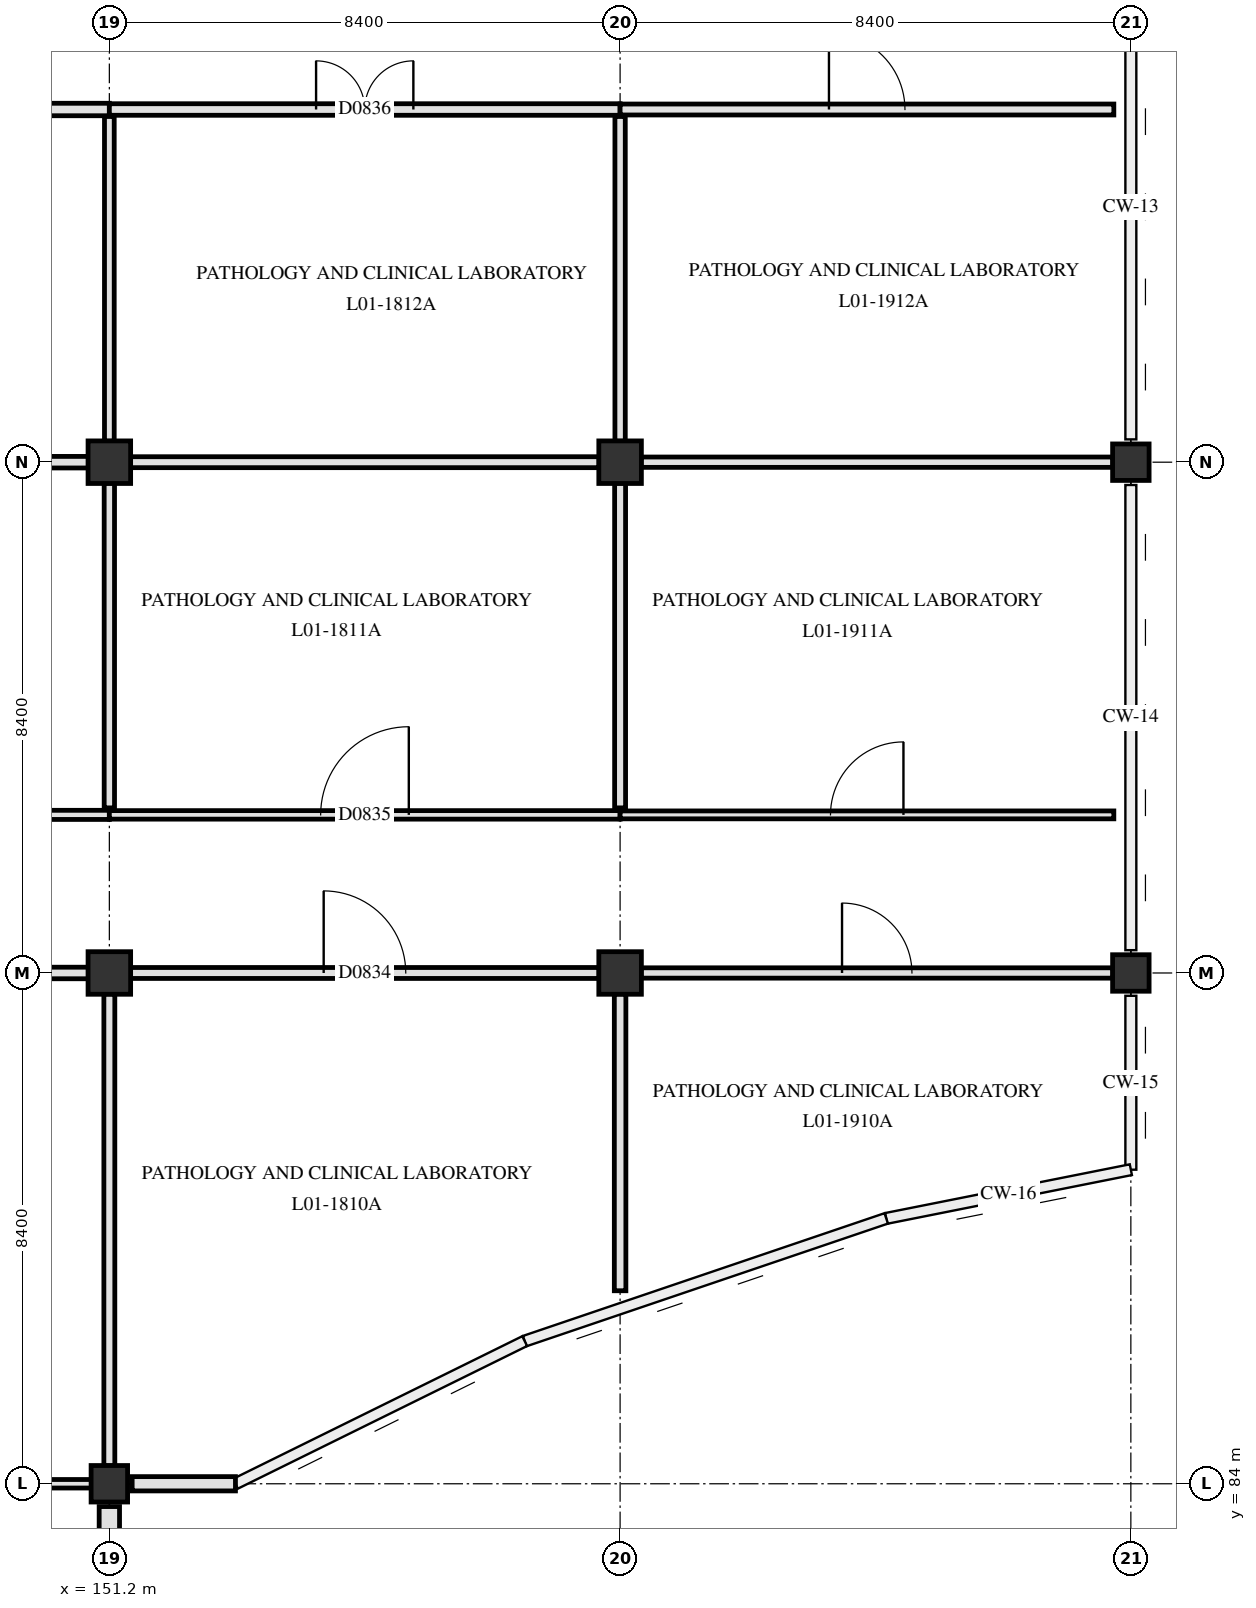
"""IFC4 building model, lengths in metres.
Left out: names, types, materials, properties, quantities, classifications, styles, units other than length and angle.
Written with IfcOpenShell. Run it as: python <this file> out.ifc"""

import sys

from ifc_helpers import new_model, si_unit, direction, frame, frame_2d, origin, origin_2d, place, context, subcontext, project, spatial, rectangle, extrude, element, fill, save


model = new_model("IFC4")
c1 = context("Model", 3, precision=1e-05, world=origin(), true_north=direction((0.0, 1.0)))
c2 = subcontext(c1, "Body", "Model", "MODEL_VIEW")
j1 = project(units=[si_unit("LENGTHUNIT", "METRE"), si_unit("PLANEANGLEUNIT", "RADIAN")], contexts=[c1])
p1 = place(None, origin())
s1 = spatial("IfcSite", under=j1, at=p1, CompositionType="ELEMENT")
p2 = place(p1, origin())
s2 = spatial("IfcBuilding", under=s1, at=p2, CompositionType="ELEMENT")
p3 = place(p2, frame((0.0, 0.0, 4.8)))
s3 = spatial("IfcBuildingStorey", under=s2, at=p3, CompositionType="ELEMENT", Elevation=4.8)
p4 = place(p3, frame((151.2, 84.0, 0.0), z_axis=(0.0, 0.0, 1.0), x_axis=(1.0, 0.0, 0.0)))
e1 = element("IfcColumn", 1, at=p4, inside=s3, PredefinedType="COLUMN", context=c2, shape_type="SweptSolid", body=[
    extrude(rectangle(XDim=0.6, YDim=0.6, at=origin_2d()), origin(), (0.0, 0.0, 1.0), 4.5),
])
for number, where, z_axis, x_axis in (
    (2, (151.2, 92.4, 0.0), (0.0, 0.0, 1.0), (1.0, 0.0, 0.0)),
    (3, (151.2, 100.8, 0.0), (0.0, 0.0, 1.0), (1.0, 0.0, 0.0)),
    (4, (159.6, 92.4, 0.0), (0.0, 0.0, 1.0), (1.0, 0.0, 0.0)),
    (5, (159.6, 100.8, 0.0), (0.0, 0.0, 1.0), (1.0, 0.0, 0.0)),
):
    element("IfcColumn", number, at=place(p3, frame(where, z_axis=z_axis, x_axis=x_axis)), inside=s3, PredefinedType="COLUMN", context=c2, shape_type="SweptSolid", body=[
        extrude(rectangle(XDim=0.7, YDim=0.7, at=origin_2d()), origin(), (0.0, 0.0, 1.0), 4.5),
    ])
for number, where, z_axis, x_axis in (
    (6, (168.0, 92.4, 0.0), (0.0, 0.0, 1.0), (1.0, 0.0, 0.0)),
    (7, (168.0, 100.8, 0.0), (0.0, 0.0, 1.0), (1.0, 0.0, 0.0)),
):
    element("IfcColumn", number, at=place(p3, frame(where, z_axis=z_axis, x_axis=x_axis)), inside=s3, PredefinedType="COLUMN", context=c2, shape_type="SweptSolid", body=[
        extrude(rectangle(XDim=0.6, YDim=0.6, at=origin_2d()), origin(), (0.0, 0.0, 1.0), 4.5),
    ])
p5 = place(p3, frame((153.274, 84.0, 0.0), z_axis=(0.0, 0.0, 1.0), x_axis=(-1.0, 0.0, 0.0)))
e8 = element("IfcWall", 8, at=p5, inside=s3, PredefinedType="SOLIDWALL", context=c2, shape_type="SweptSolid", body=[
    extrude(rectangle(XDim=1.699, YDim=0.235, at=frame_2d((0.85, 0.0))), origin(), (0.0, 0.0, 1.0), 4.14),
])
p6 = place(p3, frame((151.2, 83.625, 0.0), z_axis=(0.0, 0.0, 1.0), x_axis=(0.0, -1.0, 0.0)))
e9 = element("IfcWall", 9, at=p6, inside=s3, PredefinedType="SOLIDWALL", context=c2, shape_type="SweptSolid", body=[
    extrude(rectangle(XDim=0.858, YDim=0.335, at=frame_2d((0.429, 0.0))), origin(), (0.0, 0.0, 1.0), 4.14),
])
p7 = place(p3, frame((143.095, 84.0, 0.0), z_axis=(0.0, 0.0, 1.0), x_axis=(1.0, 0.0, 0.0)))
e10 = element("IfcWall", 10, at=p7, inside=s3, PredefinedType="PARTITIONING", context=c2, shape_type="SweptSolid", body=[
    extrude(rectangle(XDim=7.81, YDim=0.14, at=frame_2d((3.905, 0.0))), origin(), (0.0, 0.0, 1.0), 3.54),
])
p8 = place(p7, frame((3.295, 0.0, 0.0)))
e11 = element("IfcOpeningElement", 11, at=p8, cuts=e10, PredefinedType="OPENING", context=c2, shape_type="SweptSolid", body=[
    extrude(rectangle(XDim=1.22, YDim=2.18, at=frame_2d((0.61, 1.09))), frame((0.0, 0.08, 0.0), z_axis=(0.0, -1.0, 0.0), x_axis=(1.0, 0.0, 0.0)), (0.0, 0.0, 1.0), 0.16),
])
p9 = place(p3, frame((143.145, 92.4, 0.0), z_axis=(0.0, 0.0, 1.0), x_axis=(1.0, 0.0, 0.0)))
e12 = element("IfcWall", 12, at=p9, inside=s3, PredefinedType="PARTITIONING", context=c2, shape_type="SweptSolid", body=[
    extrude(rectangle(XDim=7.71, YDim=0.19, at=frame_2d((3.855, 0.0))), origin(), (0.0, 0.0, 1.0), 3.54),
])
p10 = place(p9, frame((3.195, 0.0, 0.0)))
e13 = element("IfcOpeningElement", 13, at=p10, cuts=e12, PredefinedType="OPENING", context=c2, shape_type="SweptSolid", body=[
    extrude(rectangle(XDim=1.32, YDim=2.18, at=frame_2d((0.66, 1.09))), frame((0.0, 0.105, 0.0), z_axis=(0.0, -1.0, 0.0), x_axis=(1.0, 0.0, 0.0)), (0.0, 0.0, 1.0), 0.21),
])
p11 = place(p3, frame((151.545, 92.4, 0.0), z_axis=(0.0, 0.0, 1.0), x_axis=(1.0, 0.0, 0.0)))
e14 = element("IfcWall", 14, at=p11, inside=s3, PredefinedType="PARTITIONING", context=c2, shape_type="SweptSolid", body=[
    extrude(rectangle(XDim=7.71, YDim=0.18, at=frame_2d((3.855, 0.0))), origin(), (0.0, 0.0, 1.0), 3.54),
])
p12 = place(p11, frame((3.18, 0.0, 0.0)))
e15 = element("IfcOpeningElement", 15, at=p12, cuts=e14, PredefinedType="OPENING", context=c2, shape_type="SweptSolid", body=[
    extrude(rectangle(XDim=1.35, YDim=2.2, at=frame_2d((0.675, 1.1))), frame((0.0, 0.1, 0.0), z_axis=(0.0, -1.0, 0.0), x_axis=(1.0, 0.0, 0.0)), (0.0, 0.0, 1.0), 0.2),
])
p13 = place(p3, frame((159.945, 92.4, 0.0), z_axis=(0.0, 0.0, 1.0), x_axis=(1.0, 0.0, 0.0)))
e16 = element("IfcWall", 16, at=p13, inside=s3, PredefinedType="PARTITIONING", context=c2, shape_type="SweptSolid", body=[
    extrude(rectangle(XDim=7.76, YDim=0.17, at=frame_2d((3.88, 0.0))), origin(), (0.0, 0.0, 1.0), 3.54),
])
p14 = place(p13, frame((3.305, 0.0, 0.0)))
e17 = element("IfcOpeningElement", 17, at=p14, cuts=e16, PredefinedType="OPENING", context=c2, shape_type="SweptSolid", body=[
    extrude(rectangle(XDim=1.15, YDim=2.15, at=frame_2d((0.575, 1.075))), frame((0.0, 0.095, 0.0), z_axis=(0.0, -1.0, 0.0), x_axis=(1.0, 0.0, 0.0)), (0.0, 0.0, 1.0), 0.19),
])
p15 = place(p3, frame((142.8, 95.0, 0.0), z_axis=(0.0, 0.0, 1.0), x_axis=(1.0, 0.0, 0.0)))
e18 = element("IfcWall", 18, at=p15, inside=s3, PredefinedType="PARTITIONING", context=c2, shape_type="SweptSolid", body=[
    extrude(rectangle(XDim=8.4, YDim=0.15, at=frame_2d((4.2, 0.0))), origin(), (0.0, 0.0, 1.0), 3.59),
])
p16 = place(p15, frame((3.74, 0.0, 0.0)))
e19 = element("IfcOpeningElement", 19, at=p16, cuts=e18, PredefinedType="OPENING", context=c2, shape_type="SweptSolid", body=[
    extrude(rectangle(XDim=0.92, YDim=2.08, at=frame_2d((0.46, 1.04))), frame((0.0, 0.085, 0.0), z_axis=(0.0, -1.0, 0.0), x_axis=(1.0, 0.0, 0.0)), (0.0, 0.0, 1.0), 0.17),
])
p17 = place(p3, frame((151.2, 95.0, 0.0), z_axis=(0.0, 0.0, 1.0), x_axis=(1.0, 0.0, 0.0)))
e20 = element("IfcWall", 20, at=p17, inside=s3, PredefinedType="PARTITIONING", context=c2, shape_type="SweptSolid", body=[
    extrude(rectangle(XDim=8.4, YDim=0.14, at=frame_2d((4.2, 0.0))), origin(), (0.0, 0.0, 1.0), 3.59),
])
p18 = place(p17, frame((3.475, 0.0, 0.0)))
e21 = element("IfcOpeningElement", 21, at=p18, cuts=e20, PredefinedType="OPENING", context=c2, shape_type="SweptSolid", body=[
    extrude(rectangle(XDim=1.45, YDim=2.2, at=frame_2d((0.725, 1.1))), frame((0.0, 0.08, 0.0), z_axis=(0.0, -1.0, 0.0), x_axis=(1.0, 0.0, 0.0)), (0.0, 0.0, 1.0), 0.16),
])
p19 = place(p3, frame((159.6, 95.0, 0.0), z_axis=(0.0, 0.0, 1.0), x_axis=(1.0, 0.0, 0.0)))
e22 = element("IfcWall", 22, at=p19, inside=s3, PredefinedType="PARTITIONING", context=c2, shape_type="SweptSolid", body=[
    extrude(rectangle(XDim=8.12, YDim=0.13, at=frame_2d((4.06, 0.0))), origin(), (0.0, 0.0, 1.0), 3.59),
])
p20 = place(p19, frame((3.46, 0.0, 0.0)))
e23 = element("IfcOpeningElement", 23, at=p20, cuts=e22, PredefinedType="OPENING", context=c2, shape_type="SweptSolid", body=[
    extrude(rectangle(XDim=1.2, YDim=2.15, at=frame_2d((0.6, 1.075))), frame((0.0, 0.075, 0.0), z_axis=(0.0, -1.0, 0.0), x_axis=(1.0, 0.0, 0.0)), (0.0, 0.0, 1.0), 0.15),
])
p21 = place(p3, frame((143.145, 100.8, 0.0), z_axis=(0.0, 0.0, 1.0), x_axis=(1.0, 0.0, 0.0)))
e24 = element("IfcWall", 24, at=p21, inside=s3, PredefinedType="PARTITIONING", context=c2, shape_type="SweptSolid", body=[
    extrude(rectangle(XDim=7.71, YDim=0.19, at=frame_2d((3.855, 0.0))), origin(), (0.0, 0.0, 1.0), 3.54),
])
p22 = place(p3, frame((151.545, 100.8, 0.0), z_axis=(0.0, 0.0, 1.0), x_axis=(1.0, 0.0, 0.0)))
e25 = element("IfcWall", 25, at=p22, inside=s3, PredefinedType="PARTITIONING", context=c2, shape_type="SweptSolid", body=[
    extrude(rectangle(XDim=7.71, YDim=0.18, at=frame_2d((3.855, 0.0))), origin(), (0.0, 0.0, 1.0), 3.54),
])
p23 = place(p3, frame((159.945, 100.8, 0.0), z_axis=(0.0, 0.0, 1.0), x_axis=(1.0, 0.0, 0.0)))
e26 = element("IfcWall", 26, at=p23, inside=s3, PredefinedType="PARTITIONING", context=c2, shape_type="SweptSolid", body=[
    extrude(rectangle(XDim=7.76, YDim=0.17, at=frame_2d((3.88, 0.0))), origin(), (0.0, 0.0, 1.0), 3.54),
])
p24 = place(p3, frame((142.8, 106.6, 0.0), z_axis=(0.0, 0.0, 1.0), x_axis=(1.0, 0.0, 0.0)))
e27 = element("IfcWall", 27, at=p24, inside=s3, PredefinedType="PARTITIONING", context=c2, shape_type="SweptSolid", body=[
    extrude(rectangle(XDim=8.4, YDim=0.205, at=frame_2d((4.2, 0.0))), origin(), (0.0, 0.0, 1.0), 3.59),
])
p25 = place(p24, frame((3.71, 0.0, 0.0)))
e28 = element("IfcOpeningElement", 28, at=p25, cuts=e27, PredefinedType="OPENING", context=c2, shape_type="SweptSolid", body=[
    extrude(rectangle(XDim=0.98, YDim=2.12, at=frame_2d((0.49, 1.06))), frame((0.0, 0.113, 0.0), z_axis=(0.0, -1.0, 0.0), x_axis=(1.0, 0.0, 0.0)), (0.0, 0.0, 1.0), 0.225),
])
p26 = place(p3, frame((151.2, 106.6, 0.0), z_axis=(0.0, 0.0, 1.0), x_axis=(1.0, 0.0, 0.0)))
e29 = element("IfcWall", 29, at=p26, inside=s3, PredefinedType="PARTITIONING", context=c2, shape_type="SweptSolid", body=[
    extrude(rectangle(XDim=8.4, YDim=0.19, at=frame_2d((4.2, 0.0))), origin(), (0.0, 0.0, 1.0), 3.59),
])
p27 = place(p26, frame((3.4, 0.0, 0.0)))
e30 = element("IfcOpeningElement", 30, at=p27, cuts=e29, PredefinedType="OPENING", context=c2, shape_type="SweptSolid", body=[
    extrude(rectangle(XDim=1.6, YDim=2.25, at=frame_2d((0.8, 1.125))), frame((0.0, 0.105, 0.0), z_axis=(0.0, -1.0, 0.0), x_axis=(1.0, 0.0, 0.0)), (0.0, 0.0, 1.0), 0.21),
])
p28 = place(p3, frame((159.6, 106.6, 0.0), z_axis=(0.0, 0.0, 1.0), x_axis=(1.0, 0.0, 0.0)))
e31 = element("IfcWall", 31, at=p28, inside=s3, PredefinedType="PARTITIONING", context=c2, shape_type="SweptSolid", body=[
    extrude(rectangle(XDim=8.12, YDim=0.18, at=frame_2d((4.06, 0.0))), origin(), (0.0, 0.0, 1.0), 3.59),
])
p29 = place(p28, frame((3.435, 0.0, 0.0)))
e32 = element("IfcOpeningElement", 32, at=p29, cuts=e31, PredefinedType="OPENING", context=c2, shape_type="SweptSolid", body=[
    extrude(rectangle(XDim=1.25, YDim=2.2, at=frame_2d((0.625, 1.1))), frame((0.0, 0.1, 0.0), z_axis=(0.0, -1.0, 0.0), x_axis=(1.0, 0.0, 0.0)), (0.0, 0.0, 1.0), 0.2),
])
p30 = place(p3, frame((151.2, 84.295, 0.0), z_axis=(0.0, 0.0, 1.0), x_axis=(0.0, 1.0, 0.0)))
e33 = element("IfcWall", 33, at=p30, inside=s3, PredefinedType="PARTITIONING", context=c2, shape_type="SweptSolid", body=[
    extrude(rectangle(XDim=7.76, YDim=0.18, at=frame_2d((3.88, 0.0))), origin(), (0.0, 0.0, 1.0), 3.59),
])
p31 = place(p3, frame((151.2, 95.115, 0.0), z_axis=(0.0, 0.0, 1.0), x_axis=(0.0, 1.0, 0.0)))
e34 = element("IfcWall", 34, at=p31, inside=s3, PredefinedType="PARTITIONING", context=c2, shape_type="SweptSolid", body=[
    extrude(rectangle(XDim=5.34, YDim=0.17, at=frame_2d((2.67, 0.0))), origin(), (0.0, 0.0, 1.0), 3.59),
])
p32 = place(p3, frame((151.2, 101.145, 0.0), z_axis=(0.0, 0.0, 1.0), x_axis=(0.0, 1.0, 0.0)))
e35 = element("IfcWall", 35, at=p32, inside=s3, PredefinedType="PARTITIONING", context=c2, shape_type="SweptSolid", body=[
    extrude(rectangle(XDim=5.34, YDim=0.16, at=frame_2d((2.67, 0.0))), origin(), (0.0, 0.0, 1.0), 3.59),
])
p33 = place(p3, frame((159.6, 87.174, 0.0), z_axis=(0.0, 0.0, 1.0), x_axis=(0.0, 1.0, 0.0)))
e36 = element("IfcWall", 36, at=p33, inside=s3, PredefinedType="PARTITIONING", context=c2, shape_type="SweptSolid", body=[
    extrude(rectangle(XDim=4.881, YDim=0.19, at=frame_2d((2.44, 0.0))), origin(), (0.0, 0.0, 1.0), 4.14),
])
p34 = place(p3, frame((159.6, 95.115, 0.0), z_axis=(0.0, 0.0, 1.0), x_axis=(0.0, 1.0, 0.0)))
e37 = element("IfcWall", 37, at=p34, inside=s3, PredefinedType="PARTITIONING", context=c2, shape_type="SweptSolid", body=[
    extrude(rectangle(XDim=5.34, YDim=0.18, at=frame_2d((2.67, 0.0))), origin(), (0.0, 0.0, 1.0), 3.59),
])
p35 = place(p3, frame((159.6, 101.145, 0.0), z_axis=(0.0, 0.0, 1.0), x_axis=(0.0, 1.0, 0.0)))
e38 = element("IfcWall", 38, at=p35, inside=s3, PredefinedType="PARTITIONING", context=c2, shape_type="SweptSolid", body=[
    extrude(rectangle(XDim=5.34, YDim=0.17, at=frame_2d((2.67, 0.0))), origin(), (0.0, 0.0, 1.0), 3.59),
])
p36 = place(p12, origin())
e39 = element("IfcDoor", 39, at=p36, inside=s3, OperationType="SINGLE_SWING_LEFT", PredefinedType="DOOR", context=c2, shape_type="SweptSolid", body=[
    extrude(rectangle(XDim=1.35, YDim=2.2, at=frame_2d((0.675, 1.1))), frame((0.0, 0.025, 0.0), z_axis=(0.0, -1.0, 0.0), x_axis=(1.0, 0.0, 0.0)), (0.0, 0.0, 1.0), 0.05),
])
fill(e15, e39)
p37 = place(p18, origin())
e40 = element("IfcDoor", 40, at=p37, inside=s3, OperationType="SINGLE_SWING_RIGHT", PredefinedType="DOOR", context=c2, shape_type="SweptSolid", body=[
    extrude(rectangle(XDim=1.45, YDim=2.2, at=frame_2d((0.725, 1.1))), frame((0.0, 0.025, 0.0), z_axis=(0.0, -1.0, 0.0), x_axis=(1.0, 0.0, 0.0)), (0.0, 0.0, 1.0), 0.05),
])
fill(e21, e40)
p38 = place(p27, origin())
e41 = element("IfcDoor", 41, at=p38, inside=s3, OperationType="DOUBLE_SWING_LEFT", PredefinedType="DOOR", context=c2, shape_type="SweptSolid", body=[
    extrude(rectangle(XDim=1.6, YDim=2.25, at=frame_2d((0.8, 1.125))), frame((0.0, 0.025, 0.0), z_axis=(0.0, -1.0, 0.0), x_axis=(1.0, 0.0, 0.0)), (0.0, 0.0, 1.0), 0.05),
])
fill(e30, e41)
p39 = place(p14, origin())
e42 = element("IfcDoor", 42, at=p39, inside=s3, OperationType="SINGLE_SWING_LEFT", PredefinedType="DOOR", context=c2, shape_type="SweptSolid", body=[
    extrude(rectangle(XDim=1.15, YDim=2.15, at=frame_2d((0.575, 1.075))), frame((0.0, 0.025, 0.0), z_axis=(0.0, -1.0, 0.0), x_axis=(1.0, 0.0, 0.0)), (0.0, 0.0, 1.0), 0.05),
])
fill(e17, e42)
p40 = place(p20, origin())
e43 = element("IfcDoor", 43, at=p40, inside=s3, OperationType="SINGLE_SWING_RIGHT", PredefinedType="DOOR", context=c2, shape_type="SweptSolid", body=[
    extrude(rectangle(XDim=1.2, YDim=2.15, at=frame_2d((0.6, 1.075))), frame((0.0, 0.025, 0.0), z_axis=(0.0, -1.0, 0.0), x_axis=(1.0, 0.0, 0.0)), (0.0, 0.0, 1.0), 0.05),
])
fill(e23, e43)
p41 = place(p29, origin())
e44 = element("IfcDoor", 44, at=p41, inside=s3, OperationType="SINGLE_SWING_LEFT", PredefinedType="DOOR", context=c2, shape_type="SweptSolid", body=[
    extrude(rectangle(XDim=1.25, YDim=2.2, at=frame_2d((0.625, 1.1))), frame((0.0, 0.025, 0.0), z_axis=(0.0, -1.0, 0.0), x_axis=(1.0, 0.0, 0.0)), (0.0, 0.0, 1.0), 0.05),
])
fill(e32, e44)
save(model, sys.argv[1])
